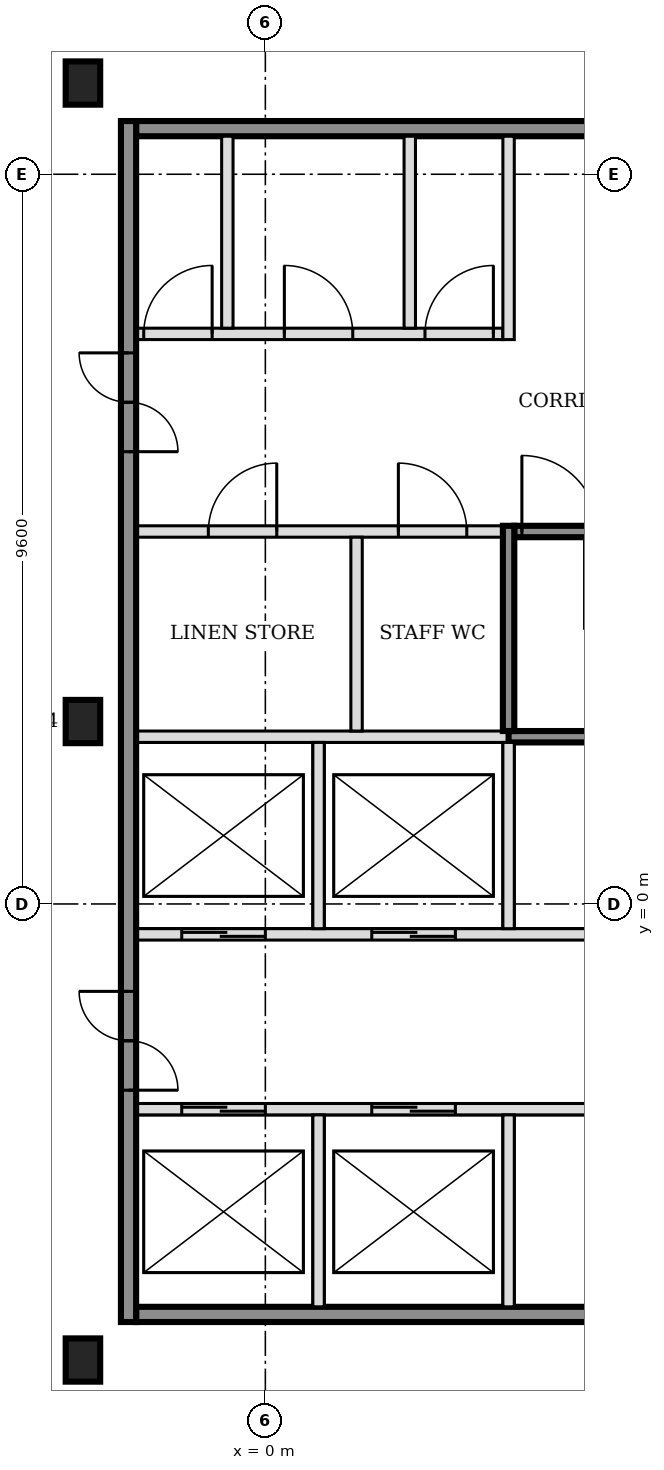
"""IFC4 building model, lengths in metres.
Left out: names, types, materials, properties, quantities, classifications, styles, units other than length and angle.
Written with IfcOpenShell. Run it as: python <this file> out.ifc"""

import sys

from ifc_helpers import new_model, si_unit, direction, frame, frame_2d, origin, origin_2d, place, context, subcontext, project, spatial, rectangle, i_section, extrude, element, fill, save


model = new_model("IFC4")
c1 = context("Model", 3, precision=1e-05, world=origin(), true_north=direction((0.0, 1.0)))
c2 = subcontext(c1, "Body", "Model", "MODEL_VIEW")
j1 = project(units=[si_unit("LENGTHUNIT", "METRE"), si_unit("PLANEANGLEUNIT", "RADIAN")], contexts=[c1])
p1 = place(None, origin())
s1 = spatial("IfcSite", under=j1, at=p1, CompositionType="ELEMENT")
p2 = place(p1, origin())
s2 = spatial("IfcBuilding", under=s1, at=p2, CompositionType="ELEMENT")
p3 = place(p2, frame((0.0, 0.0, 15.0)))
s3 = spatial("IfcBuildingStorey", under=s2, at=p3, CompositionType="ELEMENT", Elevation=15.0)
for number, where, z_axis, x_axis in (
    (1, (-2.4, -6.0, -0.2), (0.0, 0.0, 1.0), (1.0, 0.0, 0.0)),
    (2, (-2.4, 2.4, -0.2), (0.0, 0.0, 1.0), (1.0, 0.0, 0.0)),
    (3, (-2.4, 10.8, -0.2), (0.0, 0.0, 1.0), (1.0, 0.0, 0.0)),
):
    element("IfcColumn", number, at=place(p3, frame(where, z_axis=z_axis, x_axis=x_axis)), inside=s3, PredefinedType="COLUMN", context=c2, shape_type="SweptSolid", body=[
        extrude(i_section(OverallWidth=0.454, OverallDepth=0.569, WebThickness=0.078, FlangeThickness=0.125, FilletRadius=0.015, at=origin_2d()), origin(), (0.0, 0.0, 1.0), 6.0),
    ])
p4 = place(p3, frame((-1.7, -5.4, 0.0), z_axis=(0.0, 0.0, 1.0), x_axis=(1.0, 0.0, 0.0)))
e4 = element("IfcWall", 4, at=p4, inside=s3, PredefinedType="SOLIDWALL", context=c2, shape_type="SweptSolid", body=[
    extrude(rectangle(XDim=7.9, YDim=0.2, at=frame_2d((3.95, 0.0))), origin(), (0.0, 0.0, 1.0), 5.8),
])
p5 = place(p3, frame((-1.7, -2.7, 0.0), z_axis=(0.0, 0.0, 1.0), x_axis=(1.0, 0.0, 0.0)))
e5 = element("IfcWall", 5, at=p5, inside=s3, PredefinedType="SOLIDWALL", context=c2, shape_type="SweptSolid", body=[
    extrude(rectangle(XDim=7.9, YDim=0.15, at=frame_2d((3.95, 0.0))), origin(), (0.0, 0.0, 1.0), 5.8),
])
p6 = place(p5, frame((0.6, 0.0, 0.0)))
e6 = element("IfcOpeningElement", 6, at=p6, cuts=e5, PredefinedType="OPENING", context=c2, shape_type="SweptSolid", body=[
    extrude(rectangle(XDim=1.1, YDim=2.1, at=frame_2d((0.55, 1.05))), frame((0.0, 0.085, 0.0), z_axis=(0.0, -1.0, 0.0), x_axis=(1.0, 0.0, 0.0)), (0.0, 0.0, 1.0), 0.17),
])
p7 = place(p5, frame((3.1, 0.0, 0.0)))
e7 = element("IfcOpeningElement", 7, at=p7, cuts=e5, PredefinedType="OPENING", context=c2, shape_type="SweptSolid", body=[
    extrude(rectangle(XDim=1.1, YDim=2.1, at=frame_2d((0.55, 1.05))), frame((0.0, 0.085, 0.0), z_axis=(0.0, -1.0, 0.0), x_axis=(1.0, 0.0, 0.0)), (0.0, 0.0, 1.0), 0.17),
])
p8 = place(p3, frame((-1.7, -0.4, 0.0), z_axis=(0.0, 0.0, 1.0), x_axis=(1.0, 0.0, 0.0)))
e8 = element("IfcWall", 8, at=p8, inside=s3, PredefinedType="SOLIDWALL", context=c2, shape_type="SweptSolid", body=[
    extrude(rectangle(XDim=15.925, YDim=0.15, at=frame_2d((7.962, 0.0))), origin(), (0.0, 0.0, 1.0), 5.8),
])
p9 = place(p8, frame((0.6, 0.0, 0.0)))
e9 = element("IfcOpeningElement", 9, at=p9, cuts=e8, PredefinedType="OPENING", context=c2, shape_type="SweptSolid", body=[
    extrude(rectangle(XDim=1.1, YDim=2.1, at=frame_2d((0.55, 1.05))), frame((0.0, 0.085, 0.0), z_axis=(0.0, -1.0, 0.0), x_axis=(1.0, 0.0, 0.0)), (0.0, 0.0, 1.0), 0.17),
])
p10 = place(p8, frame((3.1, 0.0, 0.0)))
e10 = element("IfcOpeningElement", 10, at=p10, cuts=e8, PredefinedType="OPENING", context=c2, shape_type="SweptSolid", body=[
    extrude(rectangle(XDim=1.1, YDim=2.1, at=frame_2d((0.55, 1.05))), frame((0.0, 0.085, 0.0), z_axis=(0.0, -1.0, 0.0), x_axis=(1.0, 0.0, 0.0)), (0.0, 0.0, 1.0), 0.17),
])
p11 = place(p8, frame((11.575, 0.0, 0.0)))
e11 = element("IfcOpeningElement", 11, at=p11, cuts=e8, PredefinedType="OPENING", context=c2, shape_type="SweptSolid", body=[
    extrude(rectangle(XDim=1.2, YDim=2.1, at=frame_2d((0.6, 1.05))), frame((0.0, 0.085, 0.0), z_axis=(0.0, -1.0, 0.0), x_axis=(1.0, 0.0, 0.0)), (0.0, 0.0, 1.0), 0.17),
])
p12 = place(p8, frame((14.125, 0.0, 0.0)))
e12 = element("IfcOpeningElement", 12, at=p12, cuts=e8, PredefinedType="OPENING", context=c2, shape_type="SweptSolid", body=[
    extrude(rectangle(XDim=1.2, YDim=2.1, at=frame_2d((0.6, 1.05))), frame((0.0, 0.085, 0.0), z_axis=(0.0, -1.0, 0.0), x_axis=(1.0, 0.0, 0.0)), (0.0, 0.0, 1.0), 0.17),
])
p13 = place(p3, frame((-1.7, 2.2, 0.0), z_axis=(0.0, 0.0, 1.0), x_axis=(1.0, 0.0, 0.0)))
e13 = element("IfcWall", 13, at=p13, inside=s3, PredefinedType="SOLIDWALL", context=c2, shape_type="SweptSolid", body=[
    extrude(rectangle(XDim=4.9, YDim=0.15, at=frame_2d((2.45, 0.0))), origin(), (0.0, 0.0, 1.0), 5.8),
])
p14 = place(p3, frame((3.2, 2.2, 0.0), z_axis=(0.0, 0.0, 1.0), x_axis=(1.0, 0.0, 0.0)))
e14 = element("IfcWall", 14, at=p14, inside=s3, PredefinedType="SOLIDWALL", context=c2, shape_type="SweptSolid", body=[
    extrude(rectangle(XDim=6.5, YDim=0.15, at=frame_2d((3.25, 0.0))), origin(), (0.0, 0.0, 1.0), 5.8),
])
p15 = place(p3, frame((-1.7, 4.9, 0.0), z_axis=(0.0, 0.0, 1.0), x_axis=(1.0, 0.0, 0.0)))
e15 = element("IfcWall", 15, at=p15, inside=s3, PredefinedType="PARTITIONING", context=c2, shape_type="SweptSolid", body=[
    extrude(rectangle(XDim=4.825, YDim=0.15, at=frame_2d((2.413, 0.0))), origin(), (0.0, 0.0, 1.0), 5.8),
])
p16 = place(p15, frame((0.95, 0.0, 0.0)))
e16 = element("IfcOpeningElement", 16, at=p16, cuts=e15, PredefinedType="OPENING", context=c2, shape_type="SweptSolid", body=[
    extrude(rectangle(XDim=0.9, YDim=2.1, at=frame_2d((0.45, 1.05))), frame((0.0, 0.085, 0.0), z_axis=(0.0, -1.0, 0.0), x_axis=(1.0, 0.0, 0.0)), (0.0, 0.0, 1.0), 0.17),
])
p17 = place(p15, frame((3.45, 0.0, 0.0)))
e17 = element("IfcOpeningElement", 17, at=p17, cuts=e15, PredefinedType="OPENING", context=c2, shape_type="SweptSolid", body=[
    extrude(rectangle(XDim=0.9, YDim=2.1, at=frame_2d((0.45, 1.05))), frame((0.0, 0.085, 0.0), z_axis=(0.0, -1.0, 0.0), x_axis=(1.0, 0.0, 0.0)), (0.0, 0.0, 1.0), 0.17),
])
p18 = place(p3, frame((3.275, 4.9, 0.0), z_axis=(0.0, 0.0, 1.0), x_axis=(1.0, 0.0, 0.0)))
e18 = element("IfcWall", 18, at=p18, inside=s3, PredefinedType="SOLIDWALL", context=c2, shape_type="SweptSolid", body=[
    extrude(rectangle(XDim=6.425, YDim=0.15, at=frame_2d((3.212, 0.0))), origin(), (0.0, 0.0, 1.0), 5.8),
])
p19 = place(p18, frame((0.1, 0.0, 0.0)))
e19 = element("IfcOpeningElement", 19, at=p19, cuts=e18, PredefinedType="OPENING", context=c2, shape_type="SweptSolid", body=[
    extrude(rectangle(XDim=1.0, YDim=2.1, at=frame_2d((0.5, 1.05))), frame((0.0, 0.085, 0.0), z_axis=(0.0, -1.0, 0.0), x_axis=(1.0, 0.0, 0.0)), (0.0, 0.0, 1.0), 0.17),
])
p20 = place(p3, frame((-1.7, 7.5, 0.0), z_axis=(0.0, 0.0, 1.0), x_axis=(1.0, 0.0, 0.0)))
e20 = element("IfcWall", 20, at=p20, inside=s3, PredefinedType="PARTITIONING", context=c2, shape_type="SweptSolid", body=[
    extrude(rectangle(XDim=4.825, YDim=0.15, at=frame_2d((2.413, 0.0))), origin(), (0.0, 0.0, 1.0), 5.8),
])
p21 = place(p20, frame((0.1, 0.0, 0.0)))
e21 = element("IfcOpeningElement", 21, at=p21, cuts=e20, PredefinedType="OPENING", context=c2, shape_type="SweptSolid", body=[
    extrude(rectangle(XDim=0.9, YDim=2.1, at=frame_2d((0.45, 1.05))), frame((0.0, 0.085, 0.0), z_axis=(0.0, -1.0, 0.0), x_axis=(1.0, 0.0, 0.0)), (0.0, 0.0, 1.0), 0.17),
])
p22 = place(p20, frame((1.95, 0.0, 0.0)))
e22 = element("IfcOpeningElement", 22, at=p22, cuts=e20, PredefinedType="OPENING", context=c2, shape_type="SweptSolid", body=[
    extrude(rectangle(XDim=0.9, YDim=2.1, at=frame_2d((0.45, 1.05))), frame((0.0, 0.085, 0.0), z_axis=(0.0, -1.0, 0.0), x_axis=(1.0, 0.0, 0.0)), (0.0, 0.0, 1.0), 0.17),
])
p23 = place(p20, frame((3.8, 0.0, 0.0)))
e23 = element("IfcOpeningElement", 23, at=p23, cuts=e20, PredefinedType="OPENING", context=c2, shape_type="SweptSolid", body=[
    extrude(rectangle(XDim=0.9, YDim=2.1, at=frame_2d((0.45, 1.05))), frame((0.0, 0.085, 0.0), z_axis=(0.0, -1.0, 0.0), x_axis=(1.0, 0.0, 0.0)), (0.0, 0.0, 1.0), 0.17),
])
p24 = place(p3, frame((-1.7, 10.2, 0.0), z_axis=(0.0, 0.0, 1.0), x_axis=(1.0, 0.0, 0.0)))
e24 = element("IfcWall", 24, at=p24, inside=s3, PredefinedType="SOLIDWALL", context=c2, shape_type="SweptSolid", body=[
    extrude(rectangle(XDim=7.9, YDim=0.2, at=frame_2d((3.95, 0.0))), origin(), (0.0, 0.0, 1.0), 5.8),
])
p25 = place(p3, frame((-1.8, -5.5, 0.0), z_axis=(0.0, 0.0, 1.0), x_axis=(0.0, 1.0, 0.0)))
e25 = element("IfcWall", 25, at=p25, inside=s3, PredefinedType="SOLIDWALL", context=c2, shape_type="SweptSolid", body=[
    extrude(rectangle(XDim=15.8, YDim=0.2, at=frame_2d((7.9, 0.0))), origin(), (0.0, 0.0, 1.0), 5.8),
])
p26 = place(p25, frame((3.05, 0.0, 0.0)))
e26 = element("IfcOpeningElement", 26, at=p26, cuts=e25, PredefinedType="OPENING", context=c2, shape_type="SweptSolid", body=[
    extrude(rectangle(XDim=1.3, YDim=2.1, at=frame_2d((0.65, 1.05))), frame((0.0, 0.11, 0.0), z_axis=(0.0, -1.0, 0.0), x_axis=(1.0, 0.0, 0.0)), (0.0, 0.0, 1.0), 0.22),
])
p27 = place(p25, frame((11.45, 0.0, 0.0)))
e27 = element("IfcOpeningElement", 27, at=p27, cuts=e25, PredefinedType="OPENING", context=c2, shape_type="SweptSolid", body=[
    extrude(rectangle(XDim=1.3, YDim=2.1, at=frame_2d((0.65, 1.05))), frame((0.0, 0.11, 0.0), z_axis=(0.0, -1.0, 0.0), x_axis=(1.0, 0.0, 0.0)), (0.0, 0.0, 1.0), 0.22),
])
p28 = place(p3, frame((-0.5, 7.575, 0.0), z_axis=(0.0, 0.0, 1.0), x_axis=(0.0, 1.0, 0.0)))
e28 = element("IfcWall", 28, at=p28, inside=s3, PredefinedType="PARTITIONING", context=c2, shape_type="SweptSolid", body=[
    extrude(rectangle(XDim=2.525, YDim=0.15, at=frame_2d((1.263, 0.0))), origin(), (0.0, 0.0, 1.0), 5.8),
])
p29 = place(p3, frame((0.7, -5.3, 0.0), z_axis=(0.0, 0.0, 1.0), x_axis=(0.0, 1.0, 0.0)))
e29 = element("IfcWall", 29, at=p29, inside=s3, PredefinedType="SOLIDWALL", context=c2, shape_type="SweptSolid", body=[
    extrude(rectangle(XDim=2.525, YDim=0.15, at=frame_2d((1.263, 0.0))), origin(), (0.0, 0.0, 1.0), 5.8),
])
p30 = place(p3, frame((0.7, -0.325, 0.0), z_axis=(0.0, 0.0, 1.0), x_axis=(0.0, 1.0, 0.0)))
e30 = element("IfcWall", 30, at=p30, inside=s3, PredefinedType="SOLIDWALL", context=c2, shape_type="SweptSolid", body=[
    extrude(rectangle(XDim=2.45, YDim=0.15, at=frame_2d((1.225, 0.0))), origin(), (0.0, 0.0, 1.0), 5.8),
])
p31 = place(p3, frame((1.2, 2.275, 0.0), z_axis=(0.0, 0.0, 1.0), x_axis=(0.0, 1.0, 0.0)))
e31 = element("IfcWall", 31, at=p31, inside=s3, PredefinedType="PARTITIONING", context=c2, shape_type="SweptSolid", body=[
    extrude(rectangle(XDim=2.55, YDim=0.15, at=frame_2d((1.275, 0.0))), origin(), (0.0, 0.0, 1.0), 5.8),
])
p32 = place(p3, frame((1.9, 7.575, 0.0), z_axis=(0.0, 0.0, 1.0), x_axis=(0.0, 1.0, 0.0)))
e32 = element("IfcWall", 32, at=p32, inside=s3, PredefinedType="PARTITIONING", context=c2, shape_type="SweptSolid", body=[
    extrude(rectangle(XDim=2.525, YDim=0.15, at=frame_2d((1.263, 0.0))), origin(), (0.0, 0.0, 1.0), 5.8),
])
p33 = place(p3, frame((3.2, -5.3, 0.0), z_axis=(0.0, 0.0, 1.0), x_axis=(0.0, 1.0, 0.0)))
e33 = element("IfcWall", 33, at=p33, inside=s3, PredefinedType="SOLIDWALL", context=c2, shape_type="SweptSolid", body=[
    extrude(rectangle(XDim=2.525, YDim=0.15, at=frame_2d((1.263, 0.0))), origin(), (0.0, 0.0, 1.0), 5.8),
])
p34 = place(p3, frame((3.2, -0.325, 0.0), z_axis=(0.0, 0.0, 1.0), x_axis=(0.0, 1.0, 0.0)))
e34 = element("IfcWall", 34, at=p34, inside=s3, PredefinedType="SOLIDWALL", context=c2, shape_type="SweptSolid", body=[
    extrude(rectangle(XDim=2.45, YDim=0.15, at=frame_2d((1.225, 0.0))), origin(), (0.0, 0.0, 1.0), 5.8),
])
p35 = place(p3, frame((3.2, 2.275, 0.0), z_axis=(0.0, 0.0, 1.0), x_axis=(0.0, 1.0, 0.0)))
e35 = element("IfcWall", 35, at=p35, inside=s3, PredefinedType="SOLIDWALL", context=c2, shape_type="SweptSolid", body=[
    extrude(rectangle(XDim=2.7, YDim=0.15, at=frame_2d((1.35, 0.0))), origin(), (0.0, 0.0, 1.0), 5.8),
])
p36 = place(p3, frame((3.2, 7.425, 0.0), z_axis=(0.0, 0.0, 1.0), x_axis=(0.0, 1.0, 0.0)))
e36 = element("IfcWall", 36, at=p36, inside=s3, PredefinedType="PARTITIONING", context=c2, shape_type="SweptSolid", body=[
    extrude(rectangle(XDim=2.675, YDim=0.15, at=frame_2d((1.337, 0.0))), origin(), (0.0, 0.0, 1.0), 5.8),
])
p37 = place(p6, origin())
e37 = element("IfcDoor", 37, at=p37, inside=s3, OperationType="DOUBLE_DOOR_SLIDING", PredefinedType="DOOR", context=c2, shape_type="SweptSolid", body=[
    extrude(rectangle(XDim=1.1, YDim=2.1, at=frame_2d((0.55, 1.05))), frame((0.0, 0.025, 0.0), z_axis=(0.0, -1.0, 0.0), x_axis=(1.0, 0.0, 0.0)), (0.0, 0.0, 1.0), 0.05),
])
fill(e6, e37)
p38 = place(p7, origin())
e38 = element("IfcDoor", 38, at=p38, inside=s3, OperationType="DOUBLE_DOOR_SLIDING", PredefinedType="DOOR", context=c2, shape_type="SweptSolid", body=[
    extrude(rectangle(XDim=1.1, YDim=2.1, at=frame_2d((0.55, 1.05))), frame((0.0, 0.025, 0.0), z_axis=(0.0, -1.0, 0.0), x_axis=(1.0, 0.0, 0.0)), (0.0, 0.0, 1.0), 0.05),
])
fill(e7, e38)
p39 = place(p9, origin())
e39 = element("IfcDoor", 39, at=p39, inside=s3, OperationType="DOUBLE_DOOR_SLIDING", PredefinedType="DOOR", context=c2, shape_type="SweptSolid", body=[
    extrude(rectangle(XDim=1.1, YDim=2.1, at=frame_2d((0.55, 1.05))), frame((0.0, 0.025, 0.0), z_axis=(0.0, -1.0, 0.0), x_axis=(1.0, 0.0, 0.0)), (0.0, 0.0, 1.0), 0.05),
])
fill(e9, e39)
p40 = place(p10, origin())
e40 = element("IfcDoor", 40, at=p40, inside=s3, OperationType="DOUBLE_DOOR_SLIDING", PredefinedType="DOOR", context=c2, shape_type="SweptSolid", body=[
    extrude(rectangle(XDim=1.1, YDim=2.1, at=frame_2d((0.55, 1.05))), frame((0.0, 0.025, 0.0), z_axis=(0.0, -1.0, 0.0), x_axis=(1.0, 0.0, 0.0)), (0.0, 0.0, 1.0), 0.05),
])
fill(e10, e40)
p41 = place(p19, origin())
e41 = element("IfcDoor", 41, at=p41, inside=s3, OperationType="SINGLE_SWING_LEFT", PredefinedType="DOOR", context=c2, shape_type="SweptSolid", body=[
    extrude(rectangle(XDim=1.0, YDim=2.1, at=frame_2d((0.5, 1.05))), frame((0.0, 0.025, 0.0), z_axis=(0.0, -1.0, 0.0), x_axis=(1.0, 0.0, 0.0)), (0.0, 0.0, 1.0), 0.05),
])
fill(e19, e41)
p42 = place(p26, origin())
e42 = element("IfcDoor", 42, at=p42, inside=s3, OperationType="DOUBLE_DOOR_SINGLE_SWING", PredefinedType="DOOR", context=c2, shape_type="SweptSolid", body=[
    extrude(rectangle(XDim=1.3, YDim=2.1, at=frame_2d((0.65, 1.05))), frame((0.0, 0.025, 0.0), z_axis=(0.0, -1.0, 0.0), x_axis=(1.0, 0.0, 0.0)), (0.0, 0.0, 1.0), 0.05),
])
fill(e26, e42)
p43 = place(p27, origin())
e43 = element("IfcDoor", 43, at=p43, inside=s3, OperationType="DOUBLE_DOOR_SINGLE_SWING", PredefinedType="DOOR", context=c2, shape_type="SweptSolid", body=[
    extrude(rectangle(XDim=1.3, YDim=2.1, at=frame_2d((0.65, 1.05))), frame((0.0, 0.025, 0.0), z_axis=(0.0, -1.0, 0.0), x_axis=(1.0, 0.0, 0.0)), (0.0, 0.0, 1.0), 0.05),
])
fill(e27, e43)
p44 = place(p16, origin())
e44 = element("IfcDoor", 44, at=p44, inside=s3, OperationType="SINGLE_SWING_RIGHT", PredefinedType="DOOR", context=c2, shape_type="SweptSolid", body=[
    extrude(rectangle(XDim=0.9, YDim=2.1, at=frame_2d((0.45, 1.05))), frame((0.0, 0.025, 0.0), z_axis=(0.0, -1.0, 0.0), x_axis=(1.0, 0.0, 0.0)), (0.0, 0.0, 1.0), 0.05),
])
fill(e16, e44)
p45 = place(p17, origin())
e45 = element("IfcDoor", 45, at=p45, inside=s3, OperationType="SINGLE_SWING_LEFT", PredefinedType="DOOR", context=c2, shape_type="SweptSolid", body=[
    extrude(rectangle(XDim=0.9, YDim=2.1, at=frame_2d((0.45, 1.05))), frame((0.0, 0.025, 0.0), z_axis=(0.0, -1.0, 0.0), x_axis=(1.0, 0.0, 0.0)), (0.0, 0.0, 1.0), 0.05),
])
fill(e17, e45)
p46 = place(p21, origin())
e46 = element("IfcDoor", 46, at=p46, inside=s3, OperationType="SINGLE_SWING_RIGHT", PredefinedType="DOOR", context=c2, shape_type="SweptSolid", body=[
    extrude(rectangle(XDim=0.9, YDim=2.1, at=frame_2d((0.45, 1.05))), frame((0.0, 0.025, 0.0), z_axis=(0.0, -1.0, 0.0), x_axis=(1.0, 0.0, 0.0)), (0.0, 0.0, 1.0), 0.05),
])
fill(e21, e46)
p47 = place(p22, origin())
e47 = element("IfcDoor", 47, at=p47, inside=s3, OperationType="SINGLE_SWING_LEFT", PredefinedType="DOOR", context=c2, shape_type="SweptSolid", body=[
    extrude(rectangle(XDim=0.9, YDim=2.1, at=frame_2d((0.45, 1.05))), frame((0.0, 0.025, 0.0), z_axis=(0.0, -1.0, 0.0), x_axis=(1.0, 0.0, 0.0)), (0.0, 0.0, 1.0), 0.05),
])
fill(e22, e47)
p48 = place(p23, origin())
e48 = element("IfcDoor", 48, at=p48, inside=s3, OperationType="SINGLE_SWING_RIGHT", PredefinedType="DOOR", context=c2, shape_type="SweptSolid", body=[
    extrude(rectangle(XDim=0.9, YDim=2.1, at=frame_2d((0.45, 1.05))), frame((0.0, 0.025, 0.0), z_axis=(0.0, -1.0, 0.0), x_axis=(1.0, 0.0, 0.0)), (0.0, 0.0, 1.0), 0.05),
])
fill(e23, e48)
save(model, sys.argv[1])
